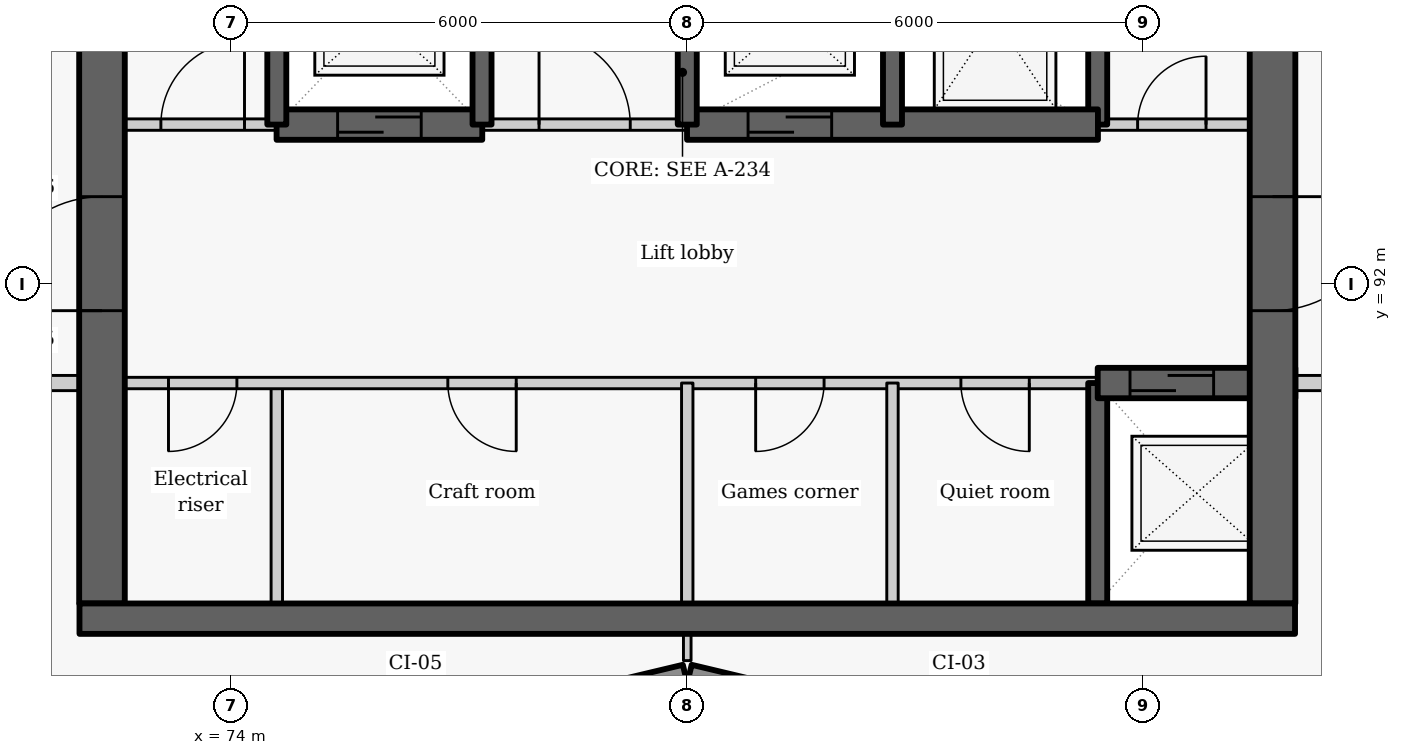
"""IFC4 building model, lengths in metres.
Left out: names, types, materials, properties, quantities, classifications, styles, units other than length and angle.
Written with IfcOpenShell. Run it as: python <this file> out.ifc"""

import sys

from ifc_helpers import new_model, si_unit, direction, frame, frame_2d, origin, place, context, subcontext, project, spatial, rectangle, extrude, element, fill, save


model = new_model("IFC4")
c1 = context("Model", 3, precision=1e-05, world=origin(), true_north=direction((0.0, 1.0)))
c2 = subcontext(c1, "Body", "Model", "MODEL_VIEW")
j1 = project(units=[si_unit("LENGTHUNIT", "METRE"), si_unit("PLANEANGLEUNIT", "RADIAN")], contexts=[c1])
p1 = place(None, origin())
s1 = spatial("IfcSite", under=j1, at=p1, CompositionType="ELEMENT")
p2 = place(p1, origin())
s2 = spatial("IfcBuilding", under=s1, at=p2, CompositionType="ELEMENT")
p3 = place(p2, frame((0.0, 0.0, 193.2)))
s3 = spatial("IfcBuildingStorey", under=s2, at=p3, CompositionType="ELEMENT", Elevation=193.2)
p4 = place(p3, frame((76.814, 86.119, 0.0), z_axis=(0.0, 0.0, 1.0), x_axis=(0.972773113459, 0.231759508395, 0.0)))
e1 = element("IfcWall", 1, at=p4, inside=s3, PredefinedType="SOLIDWALL", context=c2, shape_type="SweptSolid", body=[
    extrude(rectangle(XDim=3.246, YDim=0.25, at=frame_2d((1.623, 0.0))), origin(), (0.0, 0.0, 1.0), 2.425),
])
p5 = place(p4, frame((0.573, 0.0, 0.9)))
e2 = element("IfcOpeningElement", 2, at=p5, cuts=e1, PredefinedType="OPENING", context=c2, shape_type="SweptSolid", body=[
    extrude(rectangle(XDim=2.1, YDim=1.1, at=frame_2d((1.05, 0.55))), frame((0.0, 0.135, 0.0), z_axis=(0.0, -1.0, 0.0), x_axis=(1.0, 0.0, 0.0)), (0.0, 0.0, 1.0), 0.27),
])
p6 = place(p3, frame((80.029, 86.872, 0.0), z_axis=(0.0, 0.0, 1.0), x_axis=(0.972773113459, -0.231759508395, 0.0)))
e3 = element("IfcWall", 3, at=p6, inside=s3, PredefinedType="SOLIDWALL", context=c2, shape_type="SweptSolid", body=[
    extrude(rectangle(XDim=3.246, YDim=0.25, at=frame_2d((1.623, 0.0))), origin(), (0.0, 0.0, 1.0), 2.425),
])
p7 = place(p6, frame((0.573, 0.0, 0.9)))
e4 = element("IfcOpeningElement", 4, at=p7, cuts=e3, PredefinedType="OPENING", context=c2, shape_type="SweptSolid", body=[
    extrude(rectangle(XDim=2.1, YDim=1.1, at=frame_2d((1.05, 0.55))), frame((0.0, 0.135, 0.0), z_axis=(0.0, -1.0, 0.0), x_axis=(1.0, 0.0, 0.0)), (0.0, 0.0, 1.0), 0.27),
])
p8 = place(p3, frame((74.6, 87.8, 0.0), z_axis=(0.0, 0.0, 1.0), x_axis=(0.0, 1.0, 0.0)))
e5 = element("IfcWall", 5, at=p8, inside=s3, PredefinedType="PARTITIONING", context=c2, shape_type="SweptSolid", body=[
    extrude(rectangle(XDim=2.9, YDim=0.15, at=frame_2d((1.45, 0.0))), origin(), (0.0, 0.0, 1.0), 3.025),
])
p9 = place(p3, frame((85.4, 90.7, 0.0), z_axis=(0.0, 0.0, 1.0), x_axis=(-1.0, 0.0, 0.0)))
e6 = element("IfcWall", 6, at=p9, inside=s3, PredefinedType="PARTITIONING", context=c2, shape_type="SweptSolid", body=[
    extrude(rectangle(XDim=13.4, YDim=0.15, at=frame_2d((6.7, 0.0))), origin(), (0.0, 0.0, 1.0), 3.025),
])
p10 = place(p9, frame((11.325, 0.0, 0.0)))
e7 = element("IfcOpeningElement", 7, at=p10, cuts=e6, PredefinedType="OPENING", context=c2, shape_type="SweptSolid", body=[
    extrude(rectangle(XDim=0.9, YDim=2.1, at=frame_2d((0.45, 1.05))), frame((0.0, 0.085, 0.0), z_axis=(0.0, -1.0, 0.0), x_axis=(1.0, 0.0, 0.0)), (0.0, 0.0, 1.0), 0.17),
])
p11 = place(p9, frame((7.65, 0.0, 0.0)))
e8 = element("IfcOpeningElement", 8, at=p11, cuts=e6, PredefinedType="OPENING", context=c2, shape_type="SweptSolid", body=[
    extrude(rectangle(XDim=0.9, YDim=2.1, at=frame_2d((0.45, 1.05))), frame((0.0, 0.085, 0.0), z_axis=(0.0, -1.0, 0.0), x_axis=(1.0, 0.0, 0.0)), (0.0, 0.0, 1.0), 0.17),
])
p12 = place(p9, frame((3.6, 0.0, 0.0)))
e9 = element("IfcOpeningElement", 9, at=p12, cuts=e6, PredefinedType="OPENING", context=c2, shape_type="SweptSolid", body=[
    extrude(rectangle(XDim=0.9, YDim=2.1, at=frame_2d((0.45, 1.05))), frame((0.0, 0.085, 0.0), z_axis=(0.0, -1.0, 0.0), x_axis=(1.0, 0.0, 0.0)), (0.0, 0.0, 1.0), 0.17),
])
p13 = place(p9, frame((0.9, 0.0, 0.0)))
e10 = element("IfcOpeningElement", 10, at=p13, cuts=e6, PredefinedType="OPENING", context=c2, shape_type="SweptSolid", body=[
    extrude(rectangle(XDim=0.9, YDim=2.1, at=frame_2d((0.45, 1.05))), frame((0.0, 0.085, 0.0), z_axis=(0.0, -1.0, 0.0), x_axis=(1.0, 0.0, 0.0)), (0.0, 0.0, 1.0), 0.17),
])
p14 = place(p3, frame((72.3, 87.8, -0.275), z_axis=(0.0, 0.0, 1.0), x_axis=(0.0, 1.0, 0.0)))
e11 = element("IfcWall", 11, at=p14, inside=s3, PredefinedType="SHEAR", context=c2, shape_type="SweptSolid", body=[
    extrude(rectangle(XDim=9.1, YDim=0.6, at=frame_2d((4.55, 0.0))), origin(), (0.0, 0.0, 1.0), 3.3),
])
p15 = place(p14, frame((3.852, 0.0, 0.275)))
e12 = element("IfcOpeningElement", 12, at=p15, cuts=e11, PredefinedType="OPENING", context=c2, shape_type="SweptSolid", body=[
    extrude(rectangle(XDim=1.5, YDim=2.1, at=frame_2d((0.75, 1.05))), frame((0.0, 0.31, 0.0), z_axis=(0.0, -1.0, 0.0), x_axis=(1.0, 0.0, 0.0)), (0.0, 0.0, 1.0), 0.62),
])
p16 = place(p3, frame((85.4, 87.8, -0.275), z_axis=(0.0, 0.0, 1.0), x_axis=(0.0, 1.0, 0.0)))
e13 = element("IfcWall", 13, at=p16, inside=s3, PredefinedType="SHEAR", context=c2, shape_type="SweptSolid", body=[
    extrude(rectangle(XDim=2.9, YDim=0.25, at=frame_2d((1.45, 0.0))), origin(), (0.0, 0.0, 1.0), 3.3),
])
p17 = place(p3, frame((85.4, 94.1, -0.275), z_axis=(0.0, 0.0, 1.0), x_axis=(0.0, 1.0, 0.0)))
e14 = element("IfcWall", 14, at=p17, inside=s3, PredefinedType="SHEAR", context=c2, shape_type="SweptSolid", body=[
    extrude(rectangle(XDim=2.8, YDim=0.25, at=frame_2d((1.4, 0.0))), origin(), (0.0, 0.0, 1.0), 3.3),
])
p18 = place(p3, frame((85.4, 90.7, -0.275), z_axis=(0.0, 0.0, 1.0), x_axis=(1.0, 0.0, 0.0)))
e15 = element("IfcWall", 15, at=p18, inside=s3, PredefinedType="SHEAR", context=c2, shape_type="SweptSolid", body=[
    extrude(rectangle(XDim=2.6, YDim=0.4, at=frame_2d((1.3, 0.0))), origin(), (0.0, 0.0, 1.0), 3.3),
])
p19 = place(p18, frame((0.425, 0.0, 0.275)))
e16 = element("IfcOpeningElement", 16, at=p19, cuts=e15, PredefinedType="OPENING", context=c2, shape_type="SweptSolid", body=[
    extrude(rectangle(XDim=1.1, YDim=2.1, at=frame_2d((0.55, 1.05))), frame((0.0, 0.21, 0.0), z_axis=(0.0, -1.0, 0.0), x_axis=(1.0, 0.0, 0.0)), (0.0, 0.0, 1.0), 0.42),
])
p20 = place(p3, frame((87.7, 102.05, -0.275), z_axis=(0.0, 0.0, 1.0), x_axis=(0.0, -1.0, 0.0)))
e17 = element("IfcWall", 17, at=p20, inside=s3, PredefinedType="SHEAR", context=c2, shape_type="SweptSolid", body=[
    extrude(rectangle(XDim=14.25, YDim=0.6, at=frame_2d((7.125, 0.0))), origin(), (0.0, 0.0, 1.0), 3.3),
])
p21 = place(p20, frame((8.898, 0.0, 0.275)))
e18 = element("IfcOpeningElement", 18, at=p21, cuts=e17, PredefinedType="OPENING", context=c2, shape_type="SweptSolid", body=[
    extrude(rectangle(XDim=1.5, YDim=2.1, at=frame_2d((0.75, 1.05))), frame((0.0, 0.31, 0.0), z_axis=(0.0, -1.0, 0.0), x_axis=(1.0, 0.0, 0.0)), (0.0, 0.0, 1.0), 0.62),
])
for number, where, z_axis, x_axis in (
    (19, (80.0, 87.8, 0.0), (0.0, 0.0, 1.0), (0.0, 1.0, 0.0)),
    (20, (82.7, 87.8, 0.0), (0.0, 0.0, 1.0), (0.0, 1.0, 0.0)),
):
    element("IfcWall", number, at=place(p3, frame(where, z_axis=z_axis, x_axis=x_axis)), inside=s3, PredefinedType="PARTITIONING", context=c2, shape_type="SweptSolid", body=[
        extrude(rectangle(XDim=2.9, YDim=0.15, at=frame_2d((1.45, 0.0))), origin(), (0.0, 0.0, 1.0), 3.025),
    ])
p22 = place(p3, frame((72.0, 94.1, 0.0), z_axis=(0.0, 0.0, 1.0), x_axis=(1.0, 0.0, 0.0)))
e21 = element("IfcWall", 21, at=p22, inside=s3, PredefinedType="PARTITIONING", context=c2, shape_type="SweptSolid", body=[
    extrude(rectangle(XDim=2.603, YDim=0.15, at=frame_2d((1.302, 0.0))), origin(), (0.0, 0.0, 1.0), 3.025),
])
p23 = place(p22, frame((1.075, 0.0, 0.0)))
e22 = element("IfcOpeningElement", 22, at=p23, cuts=e21, PredefinedType="OPENING", context=c2, shape_type="SweptSolid", body=[
    extrude(rectangle(XDim=1.1, YDim=2.1, at=frame_2d((0.55, 1.05))), frame((0.0, 0.085, 0.0), z_axis=(0.0, -1.0, 0.0), x_axis=(1.0, 0.0, 0.0)), (0.0, 0.0, 1.0), 0.17),
])
p24 = place(p3, frame((77.297, 94.1, 0.0), z_axis=(0.0, 0.0, 1.0), x_axis=(1.0, 0.0, 0.0)))
e23 = element("IfcWall", 23, at=p24, inside=s3, PredefinedType="PARTITIONING", context=c2, shape_type="SweptSolid", body=[
    extrude(rectangle(XDim=2.706, YDim=0.15, at=frame_2d((1.353, 0.0))), origin(), (0.0, 0.0, 1.0), 3.025),
])
p25 = place(p24, frame((0.753, 0.0, 0.0)))
e24 = element("IfcOpeningElement", 24, at=p25, cuts=e23, PredefinedType="OPENING", context=c2, shape_type="SweptSolid", body=[
    extrude(rectangle(XDim=1.2, YDim=2.1, at=frame_2d((0.6, 1.05))), frame((0.0, 0.085, 0.0), z_axis=(0.0, -1.0, 0.0), x_axis=(1.0, 0.0, 0.0)), (0.0, 0.0, 1.0), 0.17),
])
p26 = place(p3, frame((85.397, 94.1, 0.0), z_axis=(0.0, 0.0, 1.0), x_axis=(1.0, 0.0, 0.0)))
e25 = element("IfcWall", 25, at=p26, inside=s3, PredefinedType="PARTITIONING", context=c2, shape_type="SweptSolid", body=[
    extrude(rectangle(XDim=2.603, YDim=0.15, at=frame_2d((1.302, 0.0))), origin(), (0.0, 0.0, 1.0), 3.025),
])
p27 = place(p26, frame((0.528, 0.0, 0.0)))
e26 = element("IfcOpeningElement", 26, at=p27, cuts=e25, PredefinedType="OPENING", context=c2, shape_type="SweptSolid", body=[
    extrude(rectangle(XDim=0.9, YDim=2.1, at=frame_2d((0.45, 1.05))), frame((0.0, 0.085, 0.0), z_axis=(0.0, -1.0, 0.0), x_axis=(1.0, 0.0, 0.0)), (0.0, 0.0, 1.0), 0.17),
])
p28 = place(p3, frame((74.597, 94.1, -0.275), z_axis=(0.0, 0.0, 1.0), x_axis=(1.0, 0.0, 0.0)))
e27 = element("IfcWall", 27, at=p28, inside=s3, PredefinedType="SHEAR", context=c2, shape_type="SweptSolid", body=[
    extrude(rectangle(XDim=2.706, YDim=0.4, at=frame_2d((1.353, 0.0))), origin(), (0.0, 0.0, 1.0), 3.3),
])
p29 = place(p28, frame((0.803, 0.0, 0.275)))
e28 = element("IfcOpeningElement", 28, at=p29, cuts=e27, PredefinedType="OPENING", context=c2, shape_type="SweptSolid", body=[
    extrude(rectangle(XDim=1.1, YDim=2.1, at=frame_2d((0.55, 1.05))), frame((0.0, 0.21, 0.0), z_axis=(0.0, -1.0, 0.0), x_axis=(1.0, 0.0, 0.0)), (0.0, 0.0, 1.0), 0.42),
])
p30 = place(p3, frame((79.997, 94.1, -0.275), z_axis=(0.0, 0.0, 1.0), x_axis=(1.0, 0.0, 0.0)))
e29 = element("IfcWall", 29, at=p30, inside=s3, PredefinedType="SHEAR", context=c2, shape_type="SweptSolid", body=[
    extrude(rectangle(XDim=5.406, YDim=0.4, at=frame_2d((2.703, 0.0))), origin(), (0.0, 0.0, 1.0), 3.3),
])
p31 = place(p30, frame((0.803, 0.0, 0.275)))
e30 = element("IfcOpeningElement", 30, at=p31, cuts=e29, PredefinedType="OPENING", context=c2, shape_type="SweptSolid", body=[
    extrude(rectangle(XDim=1.1, YDim=2.1, at=frame_2d((0.55, 1.05))), frame((0.0, 0.21, 0.0), z_axis=(0.0, -1.0, 0.0), x_axis=(1.0, 0.0, 0.0)), (0.0, 0.0, 1.0), 0.42),
])
for number, where, z_axis, x_axis in (
    (31, (74.6, 94.1, -0.275), (0.0, 0.0, 1.0), (0.0, 1.0, 0.0)),
    (32, (77.3, 94.1, -0.275), (0.0, 0.0, 1.0), (0.0, 1.0, 0.0)),
    (33, (80.0, 94.1, -0.275), (0.0, 0.0, 1.0), (0.0, 1.0, 0.0)),
    (34, (82.7, 94.1, -0.275), (0.0, 0.0, 1.0), (0.0, 1.0, 0.0)),
):
    element("IfcWall", number, at=place(p3, frame(where, z_axis=z_axis, x_axis=x_axis)), inside=s3, PredefinedType="SHEAR", context=c2, shape_type="SweptSolid", body=[
        extrude(rectangle(XDim=2.8, YDim=0.25, at=frame_2d((1.4, 0.0))), origin(), (0.0, 0.0, 1.0), 3.3),
    ])
for number, where, z_axis, x_axis in (
    (35, (70.45, 90.7, 0.0), (0.0, 0.0, 1.0), (1.0, 0.0, 0.0)),
    (36, (88.0, 90.7, 0.0), (0.0, 0.0, 1.0), (1.0, 0.0, 0.0)),
):
    element("IfcWall", number, at=place(p3, frame(where, z_axis=z_axis, x_axis=x_axis)), inside=s3, PredefinedType="PARTITIONING", context=c2, shape_type="SweptSolid", body=[
        extrude(rectangle(XDim=1.55, YDim=0.2, at=frame_2d((0.775, 0.0))), origin(), (0.0, 0.0, 1.0), 3.025),
    ])
p32 = place(p3, frame((80.0, 87.048, 0.0), z_axis=(0.0, 0.0, 1.0), x_axis=(0.0, 1.0, 0.0)))
e37 = element("IfcWall", 37, at=p32, inside=s3, PredefinedType="PARTITIONING", context=c2, shape_type="SweptSolid", body=[
    extrude(rectangle(XDim=0.352, YDim=0.1, at=frame_2d((0.176, 0.0))), origin(), (0.0, 0.0, 1.0), 3.025),
])
p33 = place(p3, frame((72.004, 87.6, -0.275), z_axis=(0.0, 0.0, 1.0), x_axis=(1.0, 0.0, 0.0)))
e38 = element("IfcWall", 38, at=p33, inside=s3, PredefinedType="SHEAR", context=c2, shape_type="SweptSolid", body=[
    extrude(rectangle(XDim=15.992, YDim=0.4, at=frame_2d((7.996, 0.0))), origin(), (0.0, 0.0, 1.0), 3.3),
])
p34 = place(p10, origin())
e39 = element("IfcDoor", 39, at=p34, inside=s3, OperationType="SINGLE_SWING_RIGHT", PredefinedType="DOOR", context=c2, shape_type="SweptSolid", body=[
    extrude(rectangle(XDim=0.9, YDim=2.1, at=frame_2d((0.45, 1.05))), frame((0.0, 0.025, 0.0), z_axis=(0.0, -1.0, 0.0), x_axis=(1.0, 0.0, 0.0)), (0.0, 0.0, 1.0), 0.05),
])
fill(e7, e39)
p35 = place(p19, origin())
e40 = element("IfcDoor", 40, at=p35, inside=s3, OperationType="SLIDING_TO_LEFT", PredefinedType="DOOR", context=c2, shape_type="SweptSolid", body=[
    extrude(rectangle(XDim=1.1, YDim=2.1, at=frame_2d((0.55, 1.05))), frame((0.0, 0.025, 0.0), z_axis=(0.0, -1.0, 0.0), x_axis=(1.0, 0.0, 0.0)), (0.0, 0.0, 1.0), 0.05),
])
fill(e16, e40)
p36 = place(p11, origin())
e41 = element("IfcDoor", 41, at=p36, inside=s3, OperationType="SINGLE_SWING_LEFT", PredefinedType="DOOR", context=c2, shape_type="SweptSolid", body=[
    extrude(rectangle(XDim=0.9, YDim=2.1, at=frame_2d((0.45, 1.05))), frame((0.0, 0.025, 0.0), z_axis=(0.0, -1.0, 0.0), x_axis=(1.0, 0.0, 0.0)), (0.0, 0.0, 1.0), 0.05),
])
fill(e8, e41)
p37 = place(p12, origin())
e42 = element("IfcDoor", 42, at=p37, inside=s3, OperationType="SINGLE_SWING_RIGHT", PredefinedType="DOOR", context=c2, shape_type="SweptSolid", body=[
    extrude(rectangle(XDim=0.9, YDim=2.1, at=frame_2d((0.45, 1.05))), frame((0.0, 0.025, 0.0), z_axis=(0.0, -1.0, 0.0), x_axis=(1.0, 0.0, 0.0)), (0.0, 0.0, 1.0), 0.05),
])
fill(e9, e42)
p38 = place(p13, origin())
e43 = element("IfcDoor", 43, at=p38, inside=s3, OperationType="SINGLE_SWING_LEFT", PredefinedType="DOOR", context=c2, shape_type="SweptSolid", body=[
    extrude(rectangle(XDim=0.9, YDim=2.1, at=frame_2d((0.45, 1.05))), frame((0.0, 0.025, 0.0), z_axis=(0.0, -1.0, 0.0), x_axis=(1.0, 0.0, 0.0)), (0.0, 0.0, 1.0), 0.05),
])
fill(e10, e43)
p39 = place(p23, origin())
e44 = element("IfcDoor", 44, at=p39, inside=s3, OperationType="SINGLE_SWING_RIGHT", PredefinedType="DOOR", context=c2, shape_type="SweptSolid", body=[
    extrude(rectangle(XDim=1.1, YDim=2.1, at=frame_2d((0.55, 1.05))), frame((0.0, 0.025, 0.0), z_axis=(0.0, -1.0, 0.0), x_axis=(1.0, 0.0, 0.0)), (0.0, 0.0, 1.0), 0.05),
])
fill(e22, e44)
p40 = place(p29, origin())
e45 = element("IfcDoor", 45, at=p40, inside=s3, OperationType="SLIDING_TO_LEFT", PredefinedType="DOOR", context=c2, shape_type="SweptSolid", body=[
    extrude(rectangle(XDim=1.1, YDim=2.1, at=frame_2d((0.55, 1.05))), frame((0.0, 0.025, 0.0), z_axis=(0.0, -1.0, 0.0), x_axis=(1.0, 0.0, 0.0)), (0.0, 0.0, 1.0), 0.05),
])
fill(e28, e45)
p41 = place(p25, origin())
e46 = element("IfcDoor", 46, at=p41, inside=s3, OperationType="DOUBLE_DOOR_SINGLE_SWING", PredefinedType="DOOR", context=c2, shape_type="SweptSolid", body=[
    extrude(rectangle(XDim=1.2, YDim=2.1, at=frame_2d((0.6, 1.05))), frame((0.0, 0.025, 0.0), z_axis=(0.0, -1.0, 0.0), x_axis=(1.0, 0.0, 0.0)), (0.0, 0.0, 1.0), 0.05),
])
fill(e24, e46)
p42 = place(p31, origin())
e47 = element("IfcDoor", 47, at=p42, inside=s3, OperationType="SLIDING_TO_LEFT", PredefinedType="DOOR", context=c2, shape_type="SweptSolid", body=[
    extrude(rectangle(XDim=1.1, YDim=2.1, at=frame_2d((0.55, 1.05))), frame((0.0, 0.025, 0.0), z_axis=(0.0, -1.0, 0.0), x_axis=(1.0, 0.0, 0.0)), (0.0, 0.0, 1.0), 0.05),
])
fill(e30, e47)
p43 = place(p27, origin())
e48 = element("IfcDoor", 48, at=p43, inside=s3, OperationType="SINGLE_SWING_RIGHT", PredefinedType="DOOR", context=c2, shape_type="SweptSolid", body=[
    extrude(rectangle(XDim=0.9, YDim=2.1, at=frame_2d((0.45, 1.05))), frame((0.0, 0.025, 0.0), z_axis=(0.0, -1.0, 0.0), x_axis=(1.0, 0.0, 0.0)), (0.0, 0.0, 1.0), 0.05),
])
fill(e26, e48)
p44 = place(p21, origin())
e49 = element("IfcDoor", 49, at=p44, inside=s3, OperationType="DOUBLE_DOOR_SINGLE_SWING", PredefinedType="DOOR", context=c2, shape_type="SweptSolid", body=[
    extrude(rectangle(XDim=1.5, YDim=2.1, at=frame_2d((0.75, 1.05))), frame((0.0, 0.025, 0.0), z_axis=(0.0, -1.0, 0.0), x_axis=(1.0, 0.0, 0.0)), (0.0, 0.0, 1.0), 0.05),
])
fill(e18, e49)
p45 = place(p15, origin())
e50 = element("IfcDoor", 50, at=p45, inside=s3, OperationType="DOUBLE_DOOR_SINGLE_SWING", PredefinedType="DOOR", context=c2, shape_type="SweptSolid", body=[
    extrude(rectangle(XDim=1.5, YDim=2.1, at=frame_2d((0.75, 1.05))), frame((0.0, 0.025, 0.0), z_axis=(0.0, -1.0, 0.0), x_axis=(1.0, 0.0, 0.0)), (0.0, 0.0, 1.0), 0.05),
])
fill(e12, e50)
save(model, sys.argv[1])
